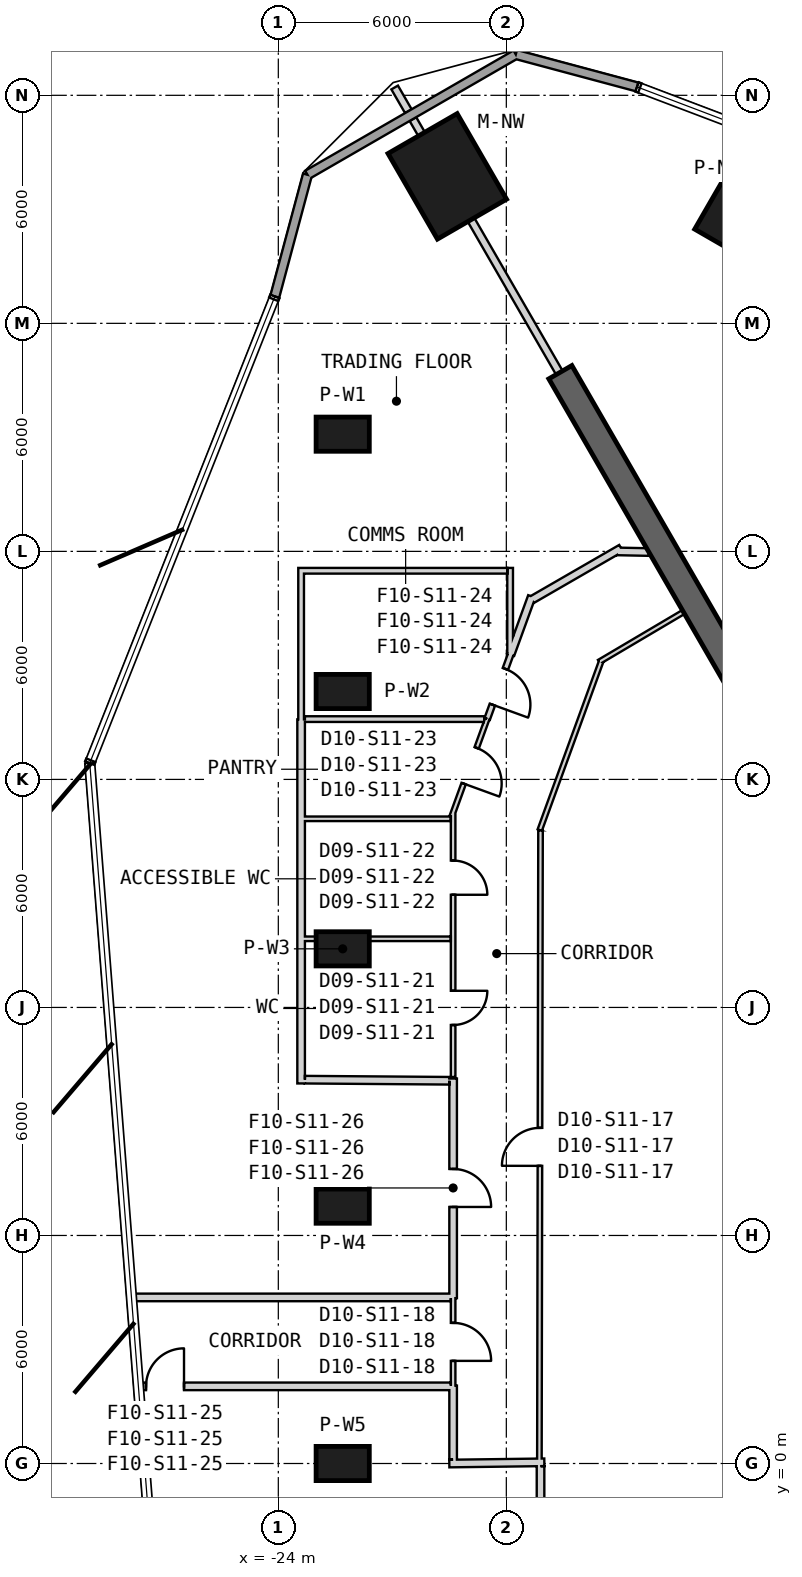
"""IFC4 building model, lengths in metres.
Left out: names, types, materials, properties, quantities, classifications, styles, units other than length and angle.
Written with IfcOpenShell. Run it as: python <this file> out.ifc"""

import sys

from ifc_helpers import new_model, si_unit, direction, frame, frame_2d, origin, origin_2d, place, context, subcontext, project, spatial, rectangle, extrude, element, fill, save


model = new_model("IFC4")
c1 = context("Model", 3, precision=1e-05, world=origin(), true_north=direction((0.0, 1.0)))
c2 = subcontext(c1, "Body", "Model", "MODEL_VIEW")
j1 = project(units=[si_unit("LENGTHUNIT", "METRE"), si_unit("PLANEANGLEUNIT", "RADIAN")], contexts=[c1])
p1 = place(None, origin())
s1 = spatial("IfcSite", under=j1, at=p1, CompositionType="ELEMENT")
p2 = place(p1, origin())
s2 = spatial("IfcBuilding", under=s1, at=p2, CompositionType="ELEMENT")
p3 = place(p2, frame((0.0, 0.0, 193.2)))
s3 = spatial("IfcBuildingStorey", under=s2, at=p3, CompositionType="ELEMENT", Elevation=193.2)
p4 = place(p3, frame((-19.553, 33.867, 0.0), z_axis=(0.0, 0.0, 1.0), x_axis=(-0.5, 0.866025403784, 0.0)))
e1 = element("IfcColumn", 1, at=p4, inside=s3, PredefinedType="COLUMN", context=c2, shape_type="SweptSolid", body=[
    extrude(rectangle(XDim=2.6, YDim=2.1, at=origin_2d()), origin(), (0.0, 0.0, 1.0), 4.0),
])
for number, where, z_axis, x_axis in (
    (2, (-22.306, 27.084, 0.0), (0.0, 0.0, 1.0), (-1.0, 0.0, 0.0)),
    (3, (-22.306, 20.313, 0.0), (0.0, 0.0, 1.0), (-1.0, 0.0, 0.0)),
    (4, (-22.306, 13.542, 0.0), (0.0, 0.0, 1.0), (-1.0, 0.0, 0.0)),
    (5, (-22.306, 6.771, 0.0), (0.0, 0.0, 1.0), (-1.0, 0.0, 0.0)),
    (6, (-22.306, 0.0, 0.0), (0.0, 0.0, 1.0), (-1.0, 0.0, 0.0)),
    (7, (-12.302, 32.859, 0.0), (0.0, 0.0, 1.0), (0.5, 0.866, 0.0)),
):
    element("IfcColumn", number, at=place(p3, frame(where, z_axis=z_axis, x_axis=x_axis)), inside=s3, PredefinedType="COLUMN", context=c2, shape_type="SweptSolid", body=[
        extrude(rectangle(XDim=1.4, YDim=0.9, at=origin_2d()), origin(), (0.0, 0.0, 1.0), 4.0),
    ])
p5 = place(p3, frame((-10.575, 18.316, 0.0), z_axis=(0.0, 0.0, 1.0), x_axis=(-0.500001138955, 0.866024746207, 0.0)))
e8 = element("IfcWall", 8, at=p5, inside=s3, PredefinedType="SHEAR", context=c2, shape_type="SweptSolid", body=[
    extrude(rectangle(XDim=12.007, YDim=0.7, at=frame_2d((6.003, 0.0))), origin(), (0.0, 0.0, 1.0), 4.0),
])
p6 = place(p3, frame((-14.56, 36.221, 0.0), z_axis=(0.0, 0.0, 1.0), x_axis=(-0.965922648034, 0.258830906222, 0.0)))
e9 = element("IfcWall", 9, at=p6, inside=s3, PredefinedType="SOLIDWALL", context=c2, shape_type="SweptSolid", body=[
    extrude(rectangle(XDim=3.303, YDim=0.24, at=frame_2d((1.652, 0.0))), origin(), (0.0, 0.0, 1.0), 3.7),
])
p7 = place(p3, frame((-17.751, 37.076, 0.0), z_axis=(0.0, 0.0, 1.0), x_axis=(-0.86602503047, -0.5000006466, 0.0)))
e10 = element("IfcWall", 10, at=p7, inside=s3, PredefinedType="SOLIDWALL", context=c2, shape_type="SweptSolid", body=[
    extrude(rectangle(XDim=6.331, YDim=0.24, at=frame_2d((3.165, 0.0))), origin(), (0.0, 0.0, 1.0), 3.7),
])
p8 = place(p3, frame((-23.233, 33.911, 0.0), z_axis=(0.0, 0.0, 1.0), x_axis=(-0.258853842949, -0.965916501562, 0.0)))
e11 = element("IfcWall", 11, at=p8, inside=s3, PredefinedType="SOLIDWALL", context=c2, shape_type="SweptSolid", body=[
    extrude(rectangle(XDim=3.316, YDim=0.24, at=frame_2d((1.658, 0.0))), origin(), (0.0, 0.0, 1.0), 3.7),
])
p9 = place(p3, frame((-13.339, 22.405, 0.0), z_axis=(0.0, 0.0, 1.0), x_axis=(-0.86070028932, -0.509111983718, 0.0)))
e12 = element("IfcWall", 12, at=p9, inside=s3, PredefinedType="PARTITIONING", context=c2, shape_type="SweptSolid", body=[
    extrude(rectangle(XDim=2.579, YDim=0.12, at=frame_2d((1.29, 0.0))), origin(), (0.0, 0.0, 1.0), 3.7),
])
p10 = place(p3, frame((-15.506, 21.103, 0.0), z_axis=(0.0, 0.0, 1.0), x_axis=(-0.342017079535, -0.939693735909, 0.0)))
e13 = element("IfcWall", 13, at=p10, inside=s3, PredefinedType="PARTITIONING", context=c2, shape_type="SweptSolid", body=[
    extrude(rectangle(XDim=4.721, YDim=0.12, at=frame_2d((2.361, 0.0))), origin(), (0.0, 0.0, 1.0), 2.78),
])
p11 = place(p3, frame((-17.13, 0.0, 0.0), z_axis=(0.0, 0.0, 1.0), x_axis=(0.001787542932, 0.999998402344, 0.0)))
e14 = element("IfcWall", 14, at=p11, inside=s3, PredefinedType="PARTITIONING", context=c2, shape_type="SweptSolid", body=[
    extrude(rectangle(XDim=16.663, YDim=0.12, at=frame_2d((8.331, 0.0))), origin(), (0.0, 0.0, 1.0), 2.88),
])
p12 = place(p11, frame((7.831, 0.0, 0.0)))
e15 = element("IfcOpeningElement", 15, at=p12, cuts=e14, PredefinedType="OPENING", context=c2, shape_type="SweptSolid", body=[
    extrude(rectangle(XDim=1.0, YDim=2.1, at=frame_2d((0.5, 1.05))), frame((0.0, 0.07, 0.0), z_axis=(0.0, -1.0, 0.0), x_axis=(1.0, 0.0, 0.0)), (0.0, 0.0, 1.0), 0.14),
])
p13 = place(p3, frame((-19.4, 17.128, 0.0), z_axis=(0.0, 0.0, 1.0), x_axis=(0.0, -1.0, 0.0)))
e16 = element("IfcWall", 16, at=p13, inside=s3, PredefinedType="PARTITIONING", context=c2, shape_type="SweptSolid", body=[
    extrude(rectangle(XDim=6.958, YDim=0.12, at=frame_2d((3.479, 0.0))), origin(), (0.0, 0.0, 1.0), 2.98),
])
p14 = place(p13, frame((4.69, 0.0, 0.0)))
e17 = element("IfcOpeningElement", 17, at=p14, cuts=e16, PredefinedType="OPENING", context=c2, shape_type="SweptSolid", body=[
    extrude(rectangle(XDim=0.9, YDim=2.1, at=frame_2d((0.45, 1.05))), frame((0.0, 0.07, 0.0), z_axis=(0.0, -1.0, 0.0), x_axis=(1.0, 0.0, 0.0)), (0.0, 0.0, 1.0), 0.14),
])
p15 = place(p13, frame((1.264, 0.0, 0.0)))
e18 = element("IfcOpeningElement", 18, at=p15, cuts=e16, PredefinedType="OPENING", context=c2, shape_type="SweptSolid", body=[
    extrude(rectangle(XDim=0.9, YDim=2.1, at=frame_2d((0.45, 1.05))), frame((0.0, 0.07, 0.0), z_axis=(0.0, -1.0, 0.0), x_axis=(1.0, 0.0, 0.0)), (0.0, 0.0, 1.0), 0.14),
])
p16 = place(p3, frame((-19.4, 4.35, 0.0), z_axis=(0.0, 0.0, 1.0), x_axis=(0.0, -1.0, 0.0)))
e19 = element("IfcWall", 19, at=p16, inside=s3, PredefinedType="PARTITIONING", context=c2, shape_type="SweptSolid", body=[
    extrude(rectangle(XDim=2.3, YDim=0.12, at=frame_2d((1.15, 0.0))), origin(), (0.0, 0.0, 1.0), 3.7),
])
p17 = place(p16, frame((0.65, 0.0, 0.0)))
e20 = element("IfcOpeningElement", 20, at=p17, cuts=e19, PredefinedType="OPENING", context=c2, shape_type="SweptSolid", body=[
    extrude(rectangle(XDim=1.0, YDim=2.1, at=frame_2d((0.5, 1.05))), frame((0.0, 0.07, 0.0), z_axis=(0.0, -1.0, 0.0), x_axis=(1.0, 0.0, 0.0)), (0.0, 0.0, 1.0), 0.14),
])
p18 = place(p3, frame((-19.5, -0.001, 0.0), z_axis=(0.0, 0.0, 1.0), x_axis=(0.999915662945, 0.012987185857, 0.0)))
e21 = element("IfcWall", 21, at=p18, inside=s3, PredefinedType="PARTITIONING", context=c2, shape_type="SweptSolid", body=[
    extrude(rectangle(XDim=2.5, YDim=0.2, at=frame_2d((1.25, 0.0))), origin(), (0.0, 0.0, 1.0), 3.07),
])
p19 = place(p3, frame((-19.4, 10.13, 0.0), z_axis=(0.0, 0.0, 1.0), x_axis=(0.0, -1.0, 0.0)))
e22 = element("IfcWall", 22, at=p19, inside=s3, PredefinedType="PARTITIONING", context=c2, shape_type="SweptSolid", body=[
    extrude(rectangle(XDim=5.78, YDim=0.2, at=frame_2d((2.89, 0.0))), origin(), (0.0, 0.0, 1.0), 3.07),
])
p20 = place(p19, frame((2.38, 0.0, 0.0)))
e23 = element("IfcOpeningElement", 23, at=p20, cuts=e22, PredefinedType="OPENING", context=c2, shape_type="SweptSolid", body=[
    extrude(rectangle(XDim=1.0, YDim=2.1, at=frame_2d((0.5, 1.05))), frame((0.0, 0.11, 0.0), z_axis=(0.0, -1.0, 0.0), x_axis=(1.0, 0.0, 0.0)), (0.0, 0.0, 1.0), 0.22),
])
p21 = place(p3, frame((-19.4, 2.05, 0.0), z_axis=(0.0, 0.0, 1.0), x_axis=(0.0, -1.0, 0.0)))
e24 = element("IfcWall", 24, at=p21, inside=s3, PredefinedType="PARTITIONING", context=c2, shape_type="SweptSolid", body=[
    extrude(rectangle(XDim=1.95, YDim=0.2, at=frame_2d((0.975, 0.0))), origin(), (0.0, 0.0, 1.0), 3.07),
])
p22 = place(p3, frame((-17.331, 22.814, 0.0), z_axis=(0.0, 0.0, 1.0), x_axis=(-0.342055959579, -0.939679583963, 0.0)))
e25 = element("IfcWall", 25, at=p22, inside=s3, PredefinedType="PARTITIONING", context=c2, shape_type="SweptSolid", body=[
    extrude(rectangle(XDim=1.629, YDim=0.2, at=frame_2d((0.814, 0.0))), origin(), (0.0, 0.0, 1.0), 2.78),
])
p23 = place(p3, frame((-14.98, 24.083, 0.0), z_axis=(0.0, 0.0, 1.0), x_axis=(-0.866008795918, -0.500028764566, 0.0)))
e26 = element("IfcWall", 26, at=p23, inside=s3, PredefinedType="PARTITIONING", context=c2, shape_type="SweptSolid", body=[
    extrude(rectangle(XDim=2.714, YDim=0.2, at=frame_2d((1.357, 0.0))), origin(), (0.0, 0.0, 1.0), 3.7),
])
p24 = place(p3, frame((-14.25, 23.982, 0.0), z_axis=(0.0, 0.0, 1.0), x_axis=(-0.999799129767, 0.02004245786, 0.0)))
e27 = element("IfcWall", 27, at=p24, inside=s3, PredefinedType="PARTITIONING", context=c2, shape_type="SweptSolid", body=[
    extrude(rectangle(XDim=0.841, YDim=0.2, at=frame_2d((0.42, 0.0))), origin(), (0.0, 0.0, 1.0), 3.7),
])
p25 = place(p3, frame((-18.503, 19.591, 0.0), z_axis=(0.0, 0.0, 1.0), x_axis=(-0.342051467618, -0.939681219085, 0.0)))
e28 = element("IfcWall", 28, at=p25, inside=s3, PredefinedType="PARTITIONING", context=c2, shape_type="SweptSolid", body=[
    extrude(rectangle(XDim=2.733, YDim=0.12, at=frame_2d((1.366, 0.0))), origin(), (0.0, 0.0, 1.0), 2.88),
])
p26 = place(p25, frame((0.811, 0.0, 0.0)))
e29 = element("IfcOpeningElement", 29, at=p26, cuts=e28, PredefinedType="OPENING", context=c2, shape_type="SweptSolid", body=[
    extrude(rectangle(XDim=1.0, YDim=2.1, at=frame_2d((0.5, 1.05))), frame((0.0, 0.07, 0.0), z_axis=(0.0, -1.0, 0.0), x_axis=(1.0, 0.0, 0.0)), (0.0, 0.0, 1.0), 0.14),
])
p27 = place(p3, frame((-17.888, 21.283, 0.0), z_axis=(0.0, 0.0, 1.0), x_axis=(-0.341939006975, -0.939722148036, 0.0)))
e30 = element("IfcWall", 30, at=p27, inside=s3, PredefinedType="PLUMBINGWALL", context=c2, shape_type="SweptSolid", body=[
    extrude(rectangle(XDim=1.801, YDim=0.15, at=frame_2d((0.9, 0.0))), origin(), (0.0, 0.0, 1.0), 3.7),
])
p28 = place(p27, frame((0.4, 0.0, 0.0)))
e31 = element("IfcOpeningElement", 31, at=p28, cuts=e30, PredefinedType="OPENING", context=c2, shape_type="SweptSolid", body=[
    extrude(rectangle(XDim=1.0, YDim=2.1, at=frame_2d((0.5, 1.05))), frame((0.0, 0.085, 0.0), z_axis=(0.0, -1.0, 0.0), x_axis=(1.0, 0.0, 0.0)), (0.0, 0.0, 1.0), 0.17),
])
p29 = place(p3, frame((-17.1, -0.07, 0.0), z_axis=(0.0, 0.0, 1.0), x_axis=(0.0, -1.0, 0.0)))
e32 = element("IfcWall", 32, at=p29, inside=s3, PredefinedType="PARTITIONING", context=c2, shape_type="SweptSolid", body=[
    extrude(rectangle(XDim=16.552, YDim=0.2, at=frame_2d((8.276, 0.0))), origin(), (0.0, 0.0, 1.0), 2.88),
])
p30 = place(p3, frame((-27.681, 2.03, 0.0), z_axis=(0.0, 0.0, 1.0), x_axis=(0.999999999559, 2.969562e-05, 0.0)))
e33 = element("IfcWall", 33, at=p30, inside=s3, PredefinedType="PARTITIONING", context=c2, shape_type="SweptSolid", body=[
    extrude(rectangle(XDim=8.221, YDim=0.2, at=frame_2d((4.111, 0.0))), origin(), (0.0, 0.0, 1.0), 3.7),
])
p31 = place(p30, frame((0.2, 0.0, 0.0)))
e34 = element("IfcOpeningElement", 34, at=p31, cuts=e33, PredefinedType="OPENING", context=c2, shape_type="SweptSolid", body=[
    extrude(rectangle(XDim=1.0, YDim=2.1, at=frame_2d((0.5, 1.05))), frame((0.0, 0.11, 0.0), z_axis=(0.0, -1.0, 0.0), x_axis=(1.0, 0.0, 0.0)), (0.0, 0.0, 1.0), 0.22),
])
p32 = place(p3, frame((-19.46, 4.37, 0.0), z_axis=(0.0, 0.0, 1.0), x_axis=(-1.0, 0.0, 0.0)))
e35 = element("IfcWall", 35, at=p32, inside=s3, PredefinedType="PARTITIONING", context=c2, shape_type="SweptSolid", body=[
    extrude(rectangle(XDim=8.404, YDim=0.2, at=frame_2d((4.202, 0.0))), origin(), (0.0, 0.0, 1.0), 3.7),
])
p33 = place(p3, frame((-20.938, 36.206, 0.0), z_axis=(0.0, 0.0, 1.0), x_axis=(0.49996696679, -0.866044474677, 0.0)))
e36 = element("IfcWall", 36, at=p33, inside=s3, PredefinedType="PARTITIONING", context=c2, shape_type="SweptSolid", body=[
    extrude(rectangle(XDim=0.72, YDim=0.2, at=frame_2d((0.36, 0.0))), origin(), (0.0, 0.0, 1.0), 3.7),
])
p34 = place(p3, frame((-20.458, 35.375, 0.0), z_axis=(0.0, 0.0, 1.0), x_axis=(0.500384246316, -0.865803445384, 0.0)))
e37 = element("IfcWall", 37, at=p34, inside=s3, PredefinedType="PARTITIONING", context=c2, shape_type="SweptSolid", body=[
    extrude(rectangle(XDim=0.458, YDim=0.2, at=frame_2d((0.229, 0.0))), origin(), (0.0, 0.0, 1.0), 3.7),
])
p35 = place(p3, frame((-18.929, 32.727, 0.0), z_axis=(0.0, 0.0, 1.0), x_axis=(0.500007271693, -0.86602120543, 0.0)))
e38 = element("IfcWall", 38, at=p35, inside=s3, PredefinedType="PARTITIONING", context=c2, shape_type="SweptSolid", body=[
    extrude(rectangle(XDim=4.65, YDim=0.2, at=frame_2d((2.325, 0.0))), origin(), (0.0, 0.0, 1.0), 3.27),
])
p36 = place(p3, frame((-23.4, 10.0, 0.0), z_axis=(0.0, 0.0, 1.0), x_axis=(0.0, 1.0, 0.0)))
e39 = element("IfcWall", 39, at=p36, inside=s3, PredefinedType="PARTITIONING", context=c2, shape_type="SweptSolid", body=[
    extrude(rectangle(XDim=6.963, YDim=0.2, at=frame_2d((3.482, 0.0))), origin(), (0.0, 0.0, 1.0), 3.7),
])
p37 = place(p3, frame((-23.4, 16.963, 0.0), z_axis=(0.0, 0.0, 1.0), x_axis=(0.0, 1.0, 0.0)))
e40 = element("IfcWall", 40, at=p37, inside=s3, PredefinedType="PARTITIONING", context=c2, shape_type="SweptSolid", body=[
    extrude(rectangle(XDim=2.616, YDim=0.2, at=frame_2d((1.308, 0.0))), origin(), (0.0, 0.0, 1.0), 3.7),
])
p38 = place(p3, frame((-23.3, 10.099, 0.0), z_axis=(0.0, 0.0, 1.0), x_axis=(0.999971749569, -0.007516652406, 0.0)))
e41 = element("IfcWall", 41, at=p38, inside=s3, PredefinedType="PARTITIONING", context=c2, shape_type="SweptSolid", body=[
    extrude(rectangle(XDim=3.8, YDim=0.2, at=frame_2d((1.9, 0.0))), origin(), (0.0, 0.0, 1.0), 3.7),
])
p39 = place(p3, frame((-17.9, 21.265, 0.0), z_axis=(0.0, 0.0, 1.0), x_axis=(0.0, 1.0, 0.0)))
e42 = element("IfcWall", 42, at=p39, inside=s3, PredefinedType="PLUMBINGWALL", context=c2, shape_type="SweptSolid", body=[
    extrude(rectangle(XDim=2.3, YDim=0.15, at=frame_2d((1.15, 0.0))), origin(), (0.0, 0.0, 1.0), 2.78),
])
p40 = place(p3, frame((-17.975, 23.49, 0.0), z_axis=(0.0, 0.0, 1.0), x_axis=(-1.0, 0.0, 0.0)))
e43 = element("IfcWall", 43, at=p40, inside=s3, PredefinedType="PLUMBINGWALL", context=c2, shape_type="SweptSolid", body=[
    extrude(rectangle(XDim=5.5, YDim=0.15, at=frame_2d((2.75, 0.0))), origin(), (0.0, 0.0, 1.0), 2.78),
])
p41 = place(p3, frame((-23.4, 19.579, 0.0), z_axis=(0.0, 0.0, 1.0), x_axis=(0.0, 1.0, 0.0)))
e44 = element("IfcWall", 44, at=p41, inside=s3, PredefinedType="PLUMBINGWALL", context=c2, shape_type="SweptSolid", body=[
    extrude(rectangle(XDim=3.836, YDim=0.15, at=frame_2d((1.918, 0.0))), origin(), (0.0, 0.0, 1.0), 3.7),
])
for number, where, z_axis, x_axis in (
    (45, (-19.46, 13.806, 0.0), (0.0, 0.0, 1.0), (-1.0, 0.0, 0.0)),
    (46, (-19.46, 16.963, 0.0), (0.0, 0.0, 1.0), (-1.0, 0.0, 0.0)),
):
    element("IfcWall", number, at=place(p3, frame(where, z_axis=z_axis, x_axis=x_axis)), inside=s3, PredefinedType="PARTITIONING", context=c2, shape_type="SweptSolid", body=[
        extrude(rectangle(XDim=3.84, YDim=0.12, at=frame_2d((1.92, 0.0))), origin(), (0.0, 0.0, 1.0), 3.7),
    ])
p42 = place(p3, frame((-23.3, 19.587, 0.0), z_axis=(0.0, 0.0, 1.0), x_axis=(1.0, 0.0, 0.0)))
e47 = element("IfcWall", 47, at=p42, inside=s3, PredefinedType="PLUMBINGWALL", context=c2, shape_type="SweptSolid", body=[
    extrude(rectangle(XDim=4.731, YDim=0.15, at=frame_2d((2.365, 0.0))), origin(), (0.0, 0.0, 1.0), 2.88),
])
p43 = place(p12, origin())
e48 = element("IfcDoor", 48, at=p43, inside=s3, OperationType="SINGLE_SWING_RIGHT", PredefinedType="NOTDEFINED", context=c2, shape_type="SweptSolid", body=[
    extrude(rectangle(XDim=1.0, YDim=2.1, at=frame_2d((0.5, 1.05))), frame((0.0, 0.025, 0.0), z_axis=(0.0, -1.0, 0.0), x_axis=(1.0, 0.0, 0.0)), (0.0, 0.0, 1.0), 0.05),
])
fill(e15, e48)
p44 = place(p17, origin())
e49 = element("IfcDoor", 49, at=p44, inside=s3, OperationType="SINGLE_SWING_RIGHT", PredefinedType="NOTDEFINED", context=c2, shape_type="SweptSolid", body=[
    extrude(rectangle(XDim=1.0, YDim=2.1, at=frame_2d((0.5, 1.05))), frame((0.0, 0.025, 0.0), z_axis=(0.0, -1.0, 0.0), x_axis=(1.0, 0.0, 0.0)), (0.0, 0.0, 1.0), 0.05),
])
fill(e20, e49)
p45 = place(p14, origin())
e50 = element("IfcDoor", 50, at=p45, inside=s3, OperationType="SINGLE_SWING_LEFT", PredefinedType="NOTDEFINED", context=c2, shape_type="SweptSolid", body=[
    extrude(rectangle(XDim=0.9, YDim=2.1, at=frame_2d((0.45, 1.05))), frame((0.0, 0.025, 0.0), z_axis=(0.0, -1.0, 0.0), x_axis=(1.0, 0.0, 0.0)), (0.0, 0.0, 1.0), 0.05),
])
fill(e17, e50)
p46 = place(p15, origin())
e51 = element("IfcDoor", 51, at=p46, inside=s3, OperationType="SINGLE_SWING_LEFT", PredefinedType="NOTDEFINED", context=c2, shape_type="SweptSolid", body=[
    extrude(rectangle(XDim=0.9, YDim=2.1, at=frame_2d((0.45, 1.05))), frame((0.0, 0.025, 0.0), z_axis=(0.0, -1.0, 0.0), x_axis=(1.0, 0.0, 0.0)), (0.0, 0.0, 1.0), 0.05),
])
fill(e18, e51)
p47 = place(p26, origin())
e52 = element("IfcDoor", 52, at=p47, inside=s3, OperationType="SINGLE_SWING_RIGHT", PredefinedType="NOTDEFINED", context=c2, shape_type="SweptSolid", body=[
    extrude(rectangle(XDim=1.0, YDim=2.1, at=frame_2d((0.5, 1.05))), frame((0.0, 0.025, 0.0), z_axis=(0.0, -1.0, 0.0), x_axis=(1.0, 0.0, 0.0)), (0.0, 0.0, 1.0), 0.05),
])
fill(e29, e52)
p48 = place(p28, origin())
e53 = element("IfcDoor", 53, at=p48, inside=s3, OperationType="SINGLE_SWING_LEFT", PredefinedType="USERDEFINED", context=c2, shape_type="SweptSolid", body=[
    extrude(rectangle(XDim=1.0, YDim=2.1, at=frame_2d((0.5, 1.05))), frame((0.0, 0.025, 0.0), z_axis=(0.0, -1.0, 0.0), x_axis=(1.0, 0.0, 0.0)), (0.0, 0.0, 1.0), 0.05),
])
fill(e31, e53)
p49 = place(p31, origin())
e54 = element("IfcDoor", 54, at=p49, inside=s3, OperationType="SINGLE_SWING_LEFT", PredefinedType="USERDEFINED", context=c2, shape_type="SweptSolid", body=[
    extrude(rectangle(XDim=1.0, YDim=2.1, at=frame_2d((0.5, 1.05))), frame((0.0, 0.025, 0.0), z_axis=(0.0, -1.0, 0.0), x_axis=(1.0, 0.0, 0.0)), (0.0, 0.0, 1.0), 0.05),
])
fill(e34, e54)
p50 = place(p20, origin())
e55 = element("IfcDoor", 55, at=p50, inside=s3, OperationType="SINGLE_SWING_LEFT", PredefinedType="USERDEFINED", context=c2, shape_type="SweptSolid", body=[
    extrude(rectangle(XDim=1.0, YDim=2.1, at=frame_2d((0.5, 1.05))), frame((0.0, 0.025, 0.0), z_axis=(0.0, -1.0, 0.0), x_axis=(1.0, 0.0, 0.0)), (0.0, 0.0, 1.0), 0.05),
])
fill(e23, e55)
save(model, sys.argv[1])
